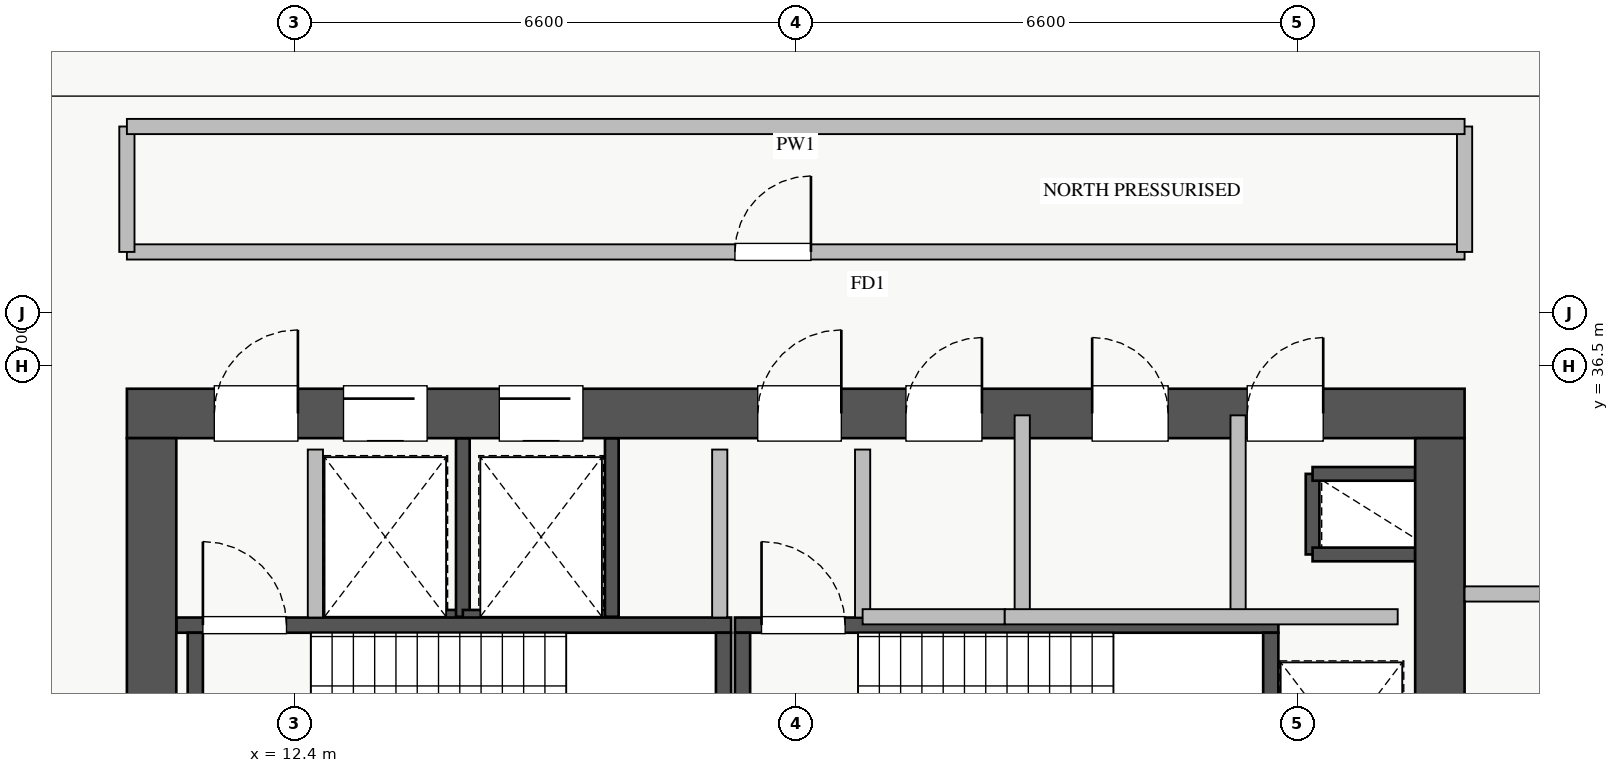
"""IFC4 building model, lengths in metres.
Left out: names, types, materials, properties, quantities, classifications, styles, units other than length and angle.
Written with IfcOpenShell. Run it as: python <this file> out.ifc"""

import sys

from ifc_helpers import new_model, si_unit, direction, frame, frame_2d, origin, place, context, subcontext, project, spatial, rectangle, extrude, source, transform, mapped, element, fill, save


model = new_model("IFC4")
c1 = context("Model", 3, precision=1e-05, world=origin(), true_north=direction((0.0, 1.0)))
c2 = subcontext(c1, "Body", "Model", "MODEL_VIEW")
j1 = project(units=[si_unit("LENGTHUNIT", "METRE"), si_unit("PLANEANGLEUNIT", "RADIAN")], contexts=[c1])
p1 = place(None, origin())
s1 = spatial("IfcSite", under=j1, at=p1, CompositionType="ELEMENT")
p2 = place(p1, origin())
s2 = spatial("IfcBuilding", under=s1, at=p2, CompositionType="ELEMENT")
p3 = place(p2, frame((0.0, 0.0, 139.25)))
s3 = spatial("IfcBuildingStorey", under=s2, at=p3, CompositionType="ELEMENT", Elevation=139.25)
p4 = place(p3, frame((12.68, 33.2, 0.0), z_axis=(0.0, 0.0, 1.0), x_axis=(1.0, 0.0, 0.0)))
e1 = element("IfcWall", 1, at=p4, inside=s3, PredefinedType="SHEAR", context=c2, shape_type="SweptSolid", body=[
    extrude(rectangle(XDim=1.94, YDim=0.18, at=frame_2d((0.97, 0.0))), origin(), (0.0, 0.0, 1.0), 4.32),
])
p5 = place(p3, frame((14.62, 33.2, 0.0), z_axis=(0.0, 0.0, 1.0), x_axis=(0.0, 1.0, 0.0)))
e2 = element("IfcWall", 2, at=p5, inside=s3, PredefinedType="SHEAR", context=c2, shape_type="SweptSolid", body=[
    extrude(rectangle(XDim=2.35, YDim=0.18, at=frame_2d((1.175, 0.0))), origin(), (0.0, 0.0, 1.0), 4.32),
])
p6 = place(p3, frame((25.8, 34.02, 0.0), z_axis=(0.0, 0.0, 1.0), x_axis=(0.0, 1.0, 0.0)))
e3 = element("IfcWall", 3, at=p6, inside=s3, PredefinedType="SHEAR", context=c2, shape_type="SweptSolid", body=[
    extrude(rectangle(XDim=1.06, YDim=0.18, at=frame_2d((0.53, 0.0))), origin(), (0.0, 0.0, 1.0), 4.32),
])
for number, where, z_axis, x_axis in (
    (4, (25.8, 35.08, 0.0), (0.0, 0.0, 1.0), (1.0, 0.0, 0.0)),
    (5, (25.8, 34.02, 0.0), (0.0, 0.0, 1.0), (1.0, 0.0, 0.0)),
):
    element("IfcWall", number, at=place(p3, frame(where, z_axis=z_axis, x_axis=x_axis)), inside=s3, PredefinedType="SHEAR", context=c2, shape_type="SweptSolid", body=[
        extrude(rectangle(XDim=1.35, YDim=0.18, at=frame_2d((0.675, 0.0))), origin(), (0.0, 0.0, 1.0), 4.32),
    ])
p7 = place(p3, frame((14.62, 33.2, 0.0), z_axis=(0.0, 0.0, 1.0), x_axis=(1.0, 0.0, 0.0)))
e6 = element("IfcWall", 6, at=p7, inside=s3, PredefinedType="SHEAR", context=c2, shape_type="SweptSolid", body=[
    extrude(rectangle(XDim=1.96, YDim=0.18, at=frame_2d((0.98, 0.0))), origin(), (0.0, 0.0, 1.0), 4.32),
])
p8 = place(p3, frame((16.58, 33.2, 0.0), z_axis=(0.0, 0.0, 1.0), x_axis=(0.0, 1.0, 0.0)))
e7 = element("IfcWall", 7, at=p8, inside=s3, PredefinedType="SHEAR", context=c2, shape_type="SweptSolid", body=[
    extrude(rectangle(XDim=2.35, YDim=0.18, at=frame_2d((1.175, 0.0))), origin(), (0.0, 0.0, 1.0), 4.32),
])
p9 = place(p3, frame((10.85, 33.09, 0.0), z_axis=(0.0, 0.0, 1.0), x_axis=(1.0, 0.0, 0.0)))
e8 = element("IfcWall", 8, at=p9, inside=s3, PredefinedType="SHEAR", context=c2, shape_type="SweptSolid", body=[
    extrude(rectangle(XDim=7.3, YDim=0.2, at=frame_2d((3.65, 0.0))), origin(), (0.0, 0.0, 1.0), 4.5),
])
p10 = place(p9, frame((0.35, 0.0, 0.0)))
e9 = element("IfcOpeningElement", 9, at=p10, cuts=e8, PredefinedType="OPENING", context=c2, shape_type="SweptSolid", body=[
    extrude(rectangle(XDim=1.1, YDim=2.05, at=frame_2d((0.55, 1.025))), frame((0.0, 0.11, 0.0), z_axis=(0.0, -1.0, 0.0), x_axis=(1.0, 0.0, 0.0)), (0.0, 0.0, 1.0), 0.22),
])
for number, where, z_axis, x_axis in (
    (10, (11.1, 30.05, 0.0), (0.0, 0.0, 1.0), (0.0, 1.0, 0.0)),
    (11, (18.05, 30.05, 0.0), (0.0, 0.0, 1.0), (0.0, 1.0, 0.0)),
):
    element("IfcWall", number, at=place(p3, frame(where, z_axis=z_axis, x_axis=x_axis)), inside=s3, PredefinedType="SHEAR", context=c2, shape_type="SweptSolid", body=[
        extrude(rectangle(XDim=2.94, YDim=0.2, at=frame_2d((1.47, 0.0))), origin(), (0.0, 0.0, 1.0), 4.5),
    ])
p11 = place(p3, frame((18.2, 33.09, 0.0), z_axis=(0.0, 0.0, 1.0), x_axis=(1.0, 0.0, 0.0)))
e12 = element("IfcWall", 12, at=p11, inside=s3, PredefinedType="SHEAR", context=c2, shape_type="SweptSolid", body=[
    extrude(rectangle(XDim=7.15, YDim=0.2, at=frame_2d((3.575, 0.0))), origin(), (0.0, 0.0, 1.0), 4.5),
])
p12 = place(p11, frame((0.35, 0.0, 0.0)))
e13 = element("IfcOpeningElement", 13, at=p12, cuts=e12, PredefinedType="OPENING", context=c2, shape_type="SweptSolid", body=[
    extrude(rectangle(XDim=1.1, YDim=2.05, at=frame_2d((0.55, 1.025))), frame((0.0, 0.11, 0.0), z_axis=(0.0, -1.0, 0.0), x_axis=(1.0, 0.0, 0.0)), (0.0, 0.0, 1.0), 0.22),
])
for number, where, z_axis, x_axis in (
    (14, (18.3, 30.05, 0.0), (0.0, 0.0, 1.0), (0.0, 1.0, 0.0)),
    (15, (25.25, 30.05, 0.0), (0.0, 0.0, 1.0), (0.0, 1.0, 0.0)),
):
    element("IfcWall", number, at=place(p3, frame(where, z_axis=z_axis, x_axis=x_axis)), inside=s3, PredefinedType="SHEAR", context=c2, shape_type="SweptSolid", body=[
        extrude(rectangle(XDim=2.94, YDim=0.2, at=frame_2d((1.47, 0.0))), origin(), (0.0, 0.0, 1.0), 4.5),
    ])
p13 = place(p3, frame((10.2, 35.875, 0.0), z_axis=(0.0, 0.0, 1.0), x_axis=(1.0, 0.0, 0.0)))
e16 = element("IfcWall", 16, at=p13, inside=s3, PredefinedType="SHEAR", context=c2, shape_type="SweptSolid", body=[
    extrude(rectangle(XDim=17.6, YDim=0.65, at=frame_2d((8.8, 0.0))), origin(), (0.0, 0.0, 1.0), 4.5),
])
p14 = place(p13, frame((1.15, 0.0, 0.0)))
e17 = element("IfcOpeningElement", 17, at=p14, cuts=e16, PredefinedType="OPENING", context=c2, shape_type="SweptSolid", body=[
    extrude(rectangle(XDim=1.1, YDim=2.05, at=frame_2d((0.55, 1.025))), frame((0.0, 0.335, 0.0), z_axis=(0.0, -1.0, 0.0), x_axis=(1.0, 0.0, 0.0)), (0.0, 0.0, 1.0), 0.67),
])
p15 = place(p13, frame((8.3, 0.0, 0.0)))
e18 = element("IfcOpeningElement", 18, at=p15, cuts=e16, PredefinedType="OPENING", context=c2, shape_type="SweptSolid", body=[
    extrude(rectangle(XDim=1.1, YDim=2.05, at=frame_2d((0.55, 1.025))), frame((0.0, 0.335, 0.0), z_axis=(0.0, -1.0, 0.0), x_axis=(1.0, 0.0, 0.0)), (0.0, 0.0, 1.0), 0.67),
])
p16 = place(p13, frame((4.9, 0.0, 0.0)))
e19 = element("IfcOpeningElement", 19, at=p16, cuts=e16, PredefinedType="OPENING", context=c2, shape_type="SweptSolid", body=[
    extrude(rectangle(XDim=1.1, YDim=2.05, at=frame_2d((0.55, 1.025))), frame((0.0, 0.335, 0.0), z_axis=(0.0, -1.0, 0.0), x_axis=(1.0, 0.0, 0.0)), (0.0, 0.0, 1.0), 0.67),
])
p17 = place(p13, frame((2.85, 0.0, 0.0)))
e20 = element("IfcOpeningElement", 20, at=p17, cuts=e16, PredefinedType="OPENING", context=c2, shape_type="SweptSolid", body=[
    extrude(rectangle(XDim=1.1, YDim=2.05, at=frame_2d((0.55, 1.025))), frame((0.0, 0.335, 0.0), z_axis=(0.0, -1.0, 0.0), x_axis=(1.0, 0.0, 0.0)), (0.0, 0.0, 1.0), 0.67),
])
p18 = place(p13, frame((14.74, 0.0, 0.0)))
e21 = element("IfcOpeningElement", 21, at=p18, cuts=e16, PredefinedType="OPENING", context=c2, shape_type="SweptSolid", body=[
    extrude(rectangle(XDim=1.0, YDim=2.05, at=frame_2d((0.5, 1.025))), frame((0.0, 0.335, 0.0), z_axis=(0.0, -1.0, 0.0), x_axis=(1.0, 0.0, 0.0)), (0.0, 0.0, 1.0), 0.67),
])
p19 = place(p13, frame((10.25, 0.0, 0.0)))
e22 = element("IfcOpeningElement", 22, at=p19, cuts=e16, PredefinedType="OPENING", context=c2, shape_type="SweptSolid", body=[
    extrude(rectangle(XDim=1.0, YDim=2.05, at=frame_2d((0.5, 1.025))), frame((0.0, 0.335, 0.0), z_axis=(0.0, -1.0, 0.0), x_axis=(1.0, 0.0, 0.0)), (0.0, 0.0, 1.0), 0.67),
])
p20 = place(p13, frame((12.7, 0.0, 0.0)))
e23 = element("IfcOpeningElement", 23, at=p20, cuts=e16, PredefinedType="OPENING", context=c2, shape_type="SweptSolid", body=[
    extrude(rectangle(XDim=1.0, YDim=2.05, at=frame_2d((0.5, 1.025))), frame((0.0, 0.335, 0.0), z_axis=(0.0, -1.0, 0.0), x_axis=(1.0, 0.0, 0.0)), (0.0, 0.0, 1.0), 0.67),
])
p21 = place(p3, frame((10.525, 29.65, 0.0), z_axis=(0.0, 0.0, 1.0), x_axis=(0.0, 1.0, 0.0)))
e24 = element("IfcWall", 24, at=p21, inside=s3, PredefinedType="SHEAR", context=c2, shape_type="SweptSolid", body=[
    extrude(rectangle(XDim=5.9, YDim=0.65, at=frame_2d((2.95, 0.0))), origin(), (0.0, 0.0, 1.0), 4.5),
])
p22 = place(p3, frame((27.475, 29.65, 0.0), z_axis=(0.0, 0.0, 1.0), x_axis=(0.0, 1.0, 0.0)))
e25 = element("IfcWall", 25, at=p22, inside=s3, PredefinedType="SHEAR", context=c2, shape_type="SweptSolid", body=[
    extrude(rectangle(XDim=5.9, YDim=0.65, at=frame_2d((2.95, 0.0))), origin(), (0.0, 0.0, 1.0), 4.5),
])
p23 = place(p22, frame((1.1, 0.0, 0.0)))
e26 = element("IfcOpeningElement", 26, at=p23, cuts=e25, PredefinedType="OPENING", context=c2, shape_type="SweptSolid", body=[
    extrude(rectangle(XDim=1.3, YDim=2.05, at=frame_2d((0.65, 1.025))), frame((0.0, 0.335, 0.0), z_axis=(0.0, -1.0, 0.0), x_axis=(1.0, 0.0, 0.0)), (0.0, 0.0, 1.0), 0.67),
])
p24 = place(p3, frame((27.8, 33.5, 0.0), z_axis=(0.0, 0.0, 1.0), x_axis=(1.0, 0.0, 0.0)))
e27 = element("IfcWall", 27, at=p24, inside=s3, PredefinedType="PARTITIONING", context=c2, shape_type="SweptSolid", body=[
    extrude(rectangle(XDim=3.1, YDim=0.2, at=frame_2d((1.55, 0.0))), origin(), (0.0, 0.0, 1.0), 3.465),
])
for number, where, z_axis, x_axis in (
    (28, (12.68, 33.19, 0.0), (0.0, 0.0, 1.0), (0.0, 1.0, 0.0)),
    (29, (18.0, 33.19, 0.0), (0.0, 0.0, 1.0), (0.0, 1.0, 0.0)),
    (30, (19.88, 33.19, 0.0), (0.0, 0.0, 1.0), (0.0, 1.0, 0.0)),
):
    element("IfcWall", number, at=place(p3, frame(where, z_axis=z_axis, x_axis=x_axis)), inside=s3, PredefinedType="PARTITIONING", context=c2, shape_type="SweptSolid", body=[
        extrude(rectangle(XDim=2.21, YDim=0.2, at=frame_2d((1.105, 0.0))), origin(), (0.0, 0.0, 1.0), 4.32),
    ])
p25 = place(p3, frame((24.82, 33.2, 0.0), z_axis=(0.0, 0.0, 1.0), x_axis=(0.0, 1.0, 0.0)))
e31 = element("IfcWall", 31, at=p25, inside=s3, PredefinedType="PARTITIONING", context=c2, shape_type="SweptSolid", body=[
    extrude(rectangle(XDim=2.65, YDim=0.2, at=frame_2d((1.325, 0.0))), origin(), (0.0, 0.0, 1.0), 4.32),
])
p26 = place(p3, frame((19.88, 33.2, 0.0), z_axis=(0.0, 0.0, 1.0), x_axis=(1.0, 0.0, 0.0)))
e32 = element("IfcWall", 32, at=p26, inside=s3, PredefinedType="PARTITIONING", context=c2, shape_type="SweptSolid", body=[
    extrude(rectangle(XDim=1.87, YDim=0.2, at=frame_2d((0.935, 0.0))), origin(), (0.0, 0.0, 1.0), 4.32),
])
p27 = place(p3, frame((21.98, 33.2, 0.0), z_axis=(0.0, 0.0, 1.0), x_axis=(0.0, 1.0, 0.0)))
e33 = element("IfcWall", 33, at=p27, inside=s3, PredefinedType="PARTITIONING", context=c2, shape_type="SweptSolid", body=[
    extrude(rectangle(XDim=2.65, YDim=0.2, at=frame_2d((1.325, 0.0))), origin(), (0.0, 0.0, 1.0), 4.32),
])
p28 = place(p3, frame((21.75, 33.2, 0.0), z_axis=(0.0, 0.0, 1.0), x_axis=(1.0, 0.0, 0.0)))
e34 = element("IfcWall", 34, at=p28, inside=s3, PredefinedType="PARTITIONING", context=c2, shape_type="SweptSolid", body=[
    extrude(rectangle(XDim=5.17, YDim=0.2, at=frame_2d((2.585, 0.0))), origin(), (0.0, 0.0, 1.0), 4.32),
])
p29 = place(p3, frame((10.2, 38.0, 0.0), z_axis=(0.0, 0.0, 1.0), x_axis=(1.0, 0.0, 0.0)))
e35 = element("IfcWall", 35, at=p29, inside=s3, PredefinedType="PARTITIONING", context=c2, shape_type="SweptSolid", body=[
    extrude(rectangle(XDim=17.6, YDim=0.2, at=frame_2d((8.8, 0.0))), origin(), (0.0, 0.0, 1.0), 4.32),
])
p30 = place(p29, frame((8.0, 0.0, 0.0)))
e36 = element("IfcOpeningElement", 36, at=p30, cuts=e35, PredefinedType="OPENING", context=c2, shape_type="SweptSolid", body=[
    extrude(rectangle(XDim=1.0, YDim=2.05, at=frame_2d((0.5, 1.025))), frame((0.0, 0.11, 0.0), z_axis=(0.0, -1.0, 0.0), x_axis=(1.0, 0.0, 0.0)), (0.0, 0.0, 1.0), 0.22),
])
for number, where, z_axis, x_axis in (
    (37, (10.2, 38.0, 0.0), (0.0, 0.0, 1.0), (0.0, 1.0, 0.0)),
    (38, (27.8, 38.0, 0.0), (0.0, 0.0, 1.0), (0.0, 1.0, 0.0)),
):
    element("IfcWall", number, at=place(p3, frame(where, z_axis=z_axis, x_axis=x_axis)), inside=s3, PredefinedType="PARTITIONING", context=c2, shape_type="SweptSolid", body=[
        extrude(rectangle(XDim=1.65, YDim=0.2, at=frame_2d((0.825, 0.0))), origin(), (0.0, 0.0, 1.0), 4.32),
    ])
p31 = place(p3, frame((10.2, 39.65, 0.0), z_axis=(0.0, 0.0, 1.0), x_axis=(1.0, 0.0, 0.0)))
e39 = element("IfcWall", 39, at=p31, inside=s3, PredefinedType="PARTITIONING", context=c2, shape_type="SweptSolid", body=[
    extrude(rectangle(XDim=17.6, YDim=0.2, at=frame_2d((8.8, 0.0))), origin(), (0.0, 0.0, 1.0), 4.32),
])
m1 = source(origin(), c2, "Body", "SweptSolid", [
    extrude(rectangle(XDim=1.1, YDim=2.05, at=frame_2d((0.55, 1.025))), frame((0.0, 0.025, 0.0), z_axis=(0.0, -1.0, 0.0), x_axis=(1.0, 0.0, 0.0)), (0.0, 0.0, 1.0), 0.05),
])
p32 = place(p14, origin())
e40 = element("IfcDoor", 40, at=p32, inside=s3, OperationType="SINGLE_SWING_RIGHT", PredefinedType="DOOR", context=c2, shape_type="MappedRepresentation", body=[
    mapped(m1, transform((0.0, 0.0, 0.0), x_axis=(1.0, 0.0, 0.0), y_axis=(0.0, 1.0, 0.0), z_axis=(0.0, 0.0, 1.0), scale=1.0)),
])
fill(e17, e40)
p33 = place(p10, origin())
e41 = element("IfcDoor", 41, at=p33, inside=s3, OperationType="SINGLE_SWING_LEFT", PredefinedType="DOOR", context=c2, shape_type="MappedRepresentation", body=[
    mapped(m1, transform((0.0, 0.0, 0.0), x_axis=(1.0, 0.0, 0.0), y_axis=(0.0, 1.0, 0.0), z_axis=(0.0, 0.0, 1.0), scale=1.0)),
])
fill(e9, e41)
p34 = place(p15, origin())
e42 = element("IfcDoor", 42, at=p34, inside=s3, OperationType="SINGLE_SWING_RIGHT", PredefinedType="DOOR", context=c2, shape_type="MappedRepresentation", body=[
    mapped(m1, transform((0.0, 0.0, 0.0), x_axis=(1.0, 0.0, 0.0), y_axis=(0.0, 1.0, 0.0), z_axis=(0.0, 0.0, 1.0), scale=1.0)),
])
fill(e18, e42)
p35 = place(p12, origin())
e43 = element("IfcDoor", 43, at=p35, inside=s3, OperationType="SINGLE_SWING_LEFT", PredefinedType="DOOR", context=c2, shape_type="MappedRepresentation", body=[
    mapped(m1, transform((0.0, 0.0, 0.0), x_axis=(1.0, 0.0, 0.0), y_axis=(0.0, 1.0, 0.0), z_axis=(0.0, 0.0, 1.0), scale=1.0)),
])
fill(e13, e43)
p36 = place(p16, origin())
e44 = element("IfcDoor", 44, at=p36, inside=s3, OperationType="SLIDING_TO_LEFT", PredefinedType="DOOR", context=c2, shape_type="MappedRepresentation", body=[
    mapped(m1, transform((0.0, 0.0, 0.0), x_axis=(1.0, 0.0, 0.0), y_axis=(0.0, 1.0, 0.0), z_axis=(0.0, 0.0, 1.0), scale=1.0)),
])
fill(e19, e44)
p37 = place(p17, origin())
e45 = element("IfcDoor", 45, at=p37, inside=s3, OperationType="SLIDING_TO_LEFT", PredefinedType="DOOR", context=c2, shape_type="MappedRepresentation", body=[
    mapped(m1, transform((0.0, 0.0, 0.0), x_axis=(1.0, 0.0, 0.0), y_axis=(0.0, 1.0, 0.0), z_axis=(0.0, 0.0, 1.0), scale=1.0)),
])
fill(e20, e45)
m2 = source(origin(), c2, "Body", "SweptSolid", [
    extrude(rectangle(XDim=1.0, YDim=2.05, at=frame_2d((0.5, 1.025))), frame((0.0, 0.025, 0.0), z_axis=(0.0, -1.0, 0.0), x_axis=(1.0, 0.0, 0.0)), (0.0, 0.0, 1.0), 0.05),
])
p38 = place(p18, origin())
e46 = element("IfcDoor", 46, at=p38, inside=s3, OperationType="SINGLE_SWING_RIGHT", PredefinedType="DOOR", context=c2, shape_type="MappedRepresentation", body=[
    mapped(m2, transform((0.0, 0.0, 0.0), x_axis=(1.0, 0.0, 0.0), y_axis=(0.0, 1.0, 0.0), z_axis=(0.0, 0.0, 1.0), scale=1.0)),
])
fill(e21, e46)
p39 = place(p19, origin())
e47 = element("IfcDoor", 47, at=p39, inside=s3, OperationType="SINGLE_SWING_RIGHT", PredefinedType="DOOR", context=c2, shape_type="MappedRepresentation", body=[
    mapped(m2, transform((0.0, 0.0, 0.0), x_axis=(1.0, 0.0, 0.0), y_axis=(0.0, 1.0, 0.0), z_axis=(0.0, 0.0, 1.0), scale=1.0)),
])
fill(e22, e47)
p40 = place(p20, origin())
e48 = element("IfcDoor", 48, at=p40, inside=s3, OperationType="SINGLE_SWING_LEFT", PredefinedType="DOOR", context=c2, shape_type="MappedRepresentation", body=[
    mapped(m2, transform((0.0, 0.0, 0.0), x_axis=(1.0, 0.0, 0.0), y_axis=(0.0, 1.0, 0.0), z_axis=(0.0, 0.0, 1.0), scale=1.0)),
])
fill(e23, e48)
p41 = place(p30, origin())
e49 = element("IfcDoor", 49, at=p41, inside=s3, OperationType="SINGLE_SWING_RIGHT", PredefinedType="DOOR", context=c2, shape_type="MappedRepresentation", body=[
    mapped(m2, transform((0.0, 0.0, 0.0), x_axis=(1.0, 0.0, 0.0), y_axis=(0.0, 1.0, 0.0), z_axis=(0.0, 0.0, 1.0), scale=1.0)),
])
fill(e36, e49)
save(model, sys.argv[1])
